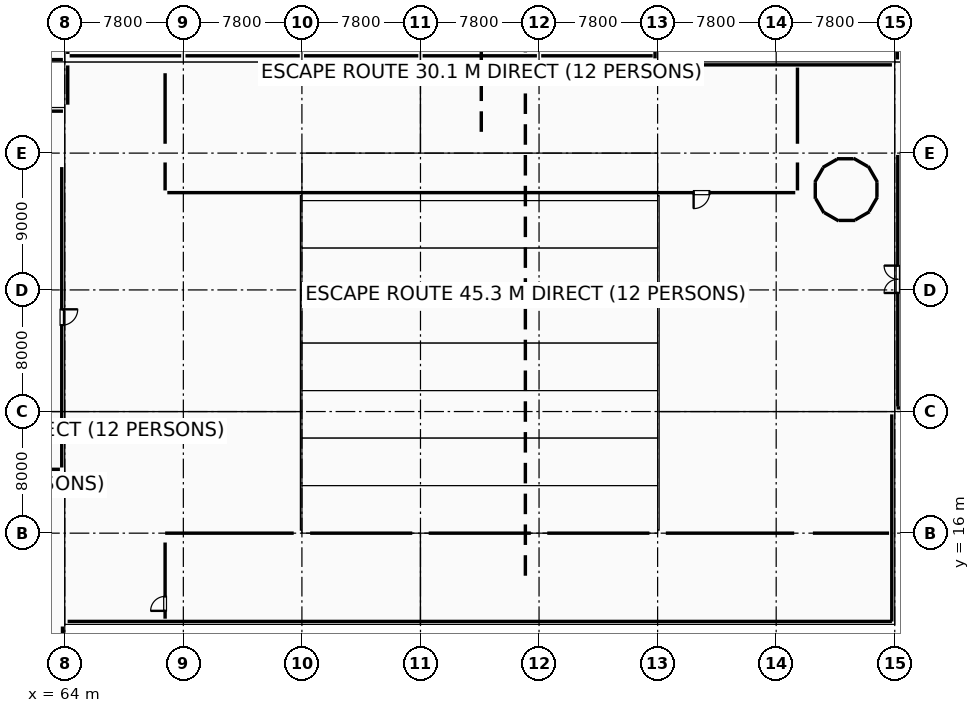
"""IFC4 building model, lengths in metres.
Left out: names, types, materials, properties, quantities, classifications, styles, units other than length and angle.
Written with IfcOpenShell. Run it as: python <this file> out.ifc"""

import sys

from ifc_helpers import new_model, si_unit, direction, frame, frame_2d, origin, origin_2d, place, context, subcontext, project, spatial, rectangle, i_section, extrude, element, fill, save


model = new_model("IFC4")
c1 = context("Model", 3, precision=1e-05, world=origin(), true_north=direction((0.0, 1.0)))
c2 = subcontext(c1, "Body", "Model", "MODEL_VIEW")
j1 = project(units=[si_unit("LENGTHUNIT", "METRE"), si_unit("PLANEANGLEUNIT", "RADIAN")], contexts=[c1])
p1 = place(None, origin())
s1 = spatial("IfcSite", under=j1, at=p1, CompositionType="ELEMENT")
p2 = place(p1, origin())
s2 = spatial("IfcBuilding", under=s1, at=p2, CompositionType="ELEMENT")
p3 = place(p2, frame((0.0, 0.0, 5.4)))
s3 = spatial("IfcBuildingStorey", under=s2, at=p3, CompositionType="ELEMENT", Elevation=5.4)
for number, where, z_axis, x_axis in (
    (1, (64.0, 47.0, 0.0), (0.0, 0.0, 1.0), (1.0, 0.0, 0.0)),
    (2, (71.8, 47.0, 0.0), (0.0, 0.0, 1.0), (1.0, 0.0, 0.0)),
    (3, (79.6, 47.0, 0.0), (0.0, 0.0, 1.0), (1.0, 0.0, 0.0)),
    (4, (87.4, 47.0, 0.0), (0.0, 0.0, 1.0), (1.0, 0.0, 0.0)),
    (5, (95.2, 47.0, 0.0), (0.0, 0.0, 1.0), (1.0, 0.0, 0.0)),
    (6, (103.0, 47.0, 0.0), (0.0, 0.0, 1.0), (1.0, 0.0, 0.0)),
):
    element("IfcColumn", number, at=place(p3, frame(where, z_axis=z_axis, x_axis=x_axis)), inside=s3, PredefinedType="COLUMN", context=c2, shape_type="SweptSolid", body=[
        extrude(i_section(OverallWidth=0.25, OverallDepth=0.45, WebThickness=0.011, FlangeThickness=0.014, FilletRadius=0.015, at=origin_2d()), origin(), (0.0, 0.0, 1.0), 4.8),
    ])
for number, where, z_axis, x_axis in (
    (7, (70.0, 16.0, 0.0), (0.0, 0.0, 1.0), (1.0, 0.0, 0.0)),
    (8, (70.0, 41.0, 0.0), (0.0, 0.0, 1.0), (1.0, 0.0, 0.0)),
):
    element("IfcColumn", number, at=place(p3, frame(where, z_axis=z_axis, x_axis=x_axis)), inside=s3, PredefinedType="COLUMN", context=c2, shape_type="SweptSolid", body=[
        extrude(rectangle(XDim=1.2, YDim=1.2, at=origin_2d()), origin(), (0.0, 0.0, 1.0), 4.8),
    ])
for number, where, z_axis, x_axis in (
    (9, (79.6, 16.0, 0.0), (0.0, 0.0, 1.0), (1.0, 0.0, 0.0)),
    (10, (79.6, 41.0, 0.0), (0.0, 0.0, 1.0), (1.0, 0.0, 0.0)),
    (11, (87.4, 16.0, 0.0), (0.0, 0.0, 1.0), (1.0, 0.0, 0.0)),
    (12, (87.4, 41.0, 0.0), (0.0, 0.0, 1.0), (1.0, 0.0, 0.0)),
    (13, (95.2, 16.0, 0.0), (0.0, 0.0, 1.0), (1.0, 0.0, 0.0)),
    (14, (95.2, 41.0, 0.0), (0.0, 0.0, 1.0), (1.0, 0.0, 0.0)),
    (15, (103.0, 16.0, 0.0), (0.0, 0.0, 1.0), (1.0, 0.0, 0.0)),
    (16, (103.0, 41.0, 0.0), (0.0, 0.0, 1.0), (1.0, 0.0, 0.0)),
):
    element("IfcColumn", number, at=place(p3, frame(where, z_axis=z_axis, x_axis=x_axis)), inside=s3, PredefinedType="COLUMN", context=c2, shape_type="SweptSolid", body=[
        extrude(rectangle(XDim=1.05, YDim=1.05, at=origin_2d()), origin(), (0.0, 0.0, 1.0), 4.8),
    ])
for number, where, z_axis, x_axis in (
    (17, (112.6, 16.0, 0.0), (0.0, 0.0, 1.0), (1.0, 0.0, 0.0)),
    (18, (112.6, 41.0, 0.0), (0.0, 0.0, 1.0), (1.0, 0.0, 0.0)),
):
    element("IfcColumn", number, at=place(p3, frame(where, z_axis=z_axis, x_axis=x_axis)), inside=s3, PredefinedType="COLUMN", context=c2, shape_type="SweptSolid", body=[
        extrude(rectangle(XDim=1.2, YDim=1.2, at=origin_2d()), origin(), (0.0, 0.0, 1.0), 4.8),
    ])
p4 = place(p3, frame((40.12, 43.76, 0.0), z_axis=(0.0, 0.0, 1.0), x_axis=(1.0, 0.0, 0.0)))
e19 = element("IfcWall", 19, at=p4, inside=s3, PredefinedType="PARAPET", context=c2, shape_type="SweptSolid", body=[
    extrude(rectangle(XDim=23.76, YDim=0.18, at=frame_2d((11.88, 0.0))), origin(), (0.0, 0.0, 1.0), 0.88),
])
p5 = place(p3, frame((64.195, 44.185, 0.0), z_axis=(0.0, 0.0, 1.0), x_axis=(0.0, 1.0, 0.0)))
e20 = element("IfcWall", 20, at=p5, inside=s3, PredefinedType="STANDARD", context=c2, shape_type="SweptSolid", body=[
    extrude(rectangle(XDim=2.582, YDim=0.35, at=frame_2d((1.291, 0.0))), origin(), (0.0, 0.0, 1.0), 3.725),
])
p6 = place(p3, frame((63.876, 47.15, 0.0), z_axis=(0.0, 0.0, 1.0), x_axis=(-1.0, 0.0, 0.0)))
e21 = element("IfcWall", 21, at=p6, inside=s3, PredefinedType="ELEMENTEDWALL", context=c2, shape_type="SweptSolid", body=[
    extrude(rectangle(XDim=9.736, YDim=0.26, at=frame_2d((4.868, 0.0))), origin(), (0.0, 0.0, 1.0), 4.54),
])
p7 = place(p6, frame((4.426, 0.0, 0.95)))
e22 = element("IfcOpeningElement", 22, at=p7, cuts=e21, PredefinedType="OPENING", context=c2, shape_type="SweptSolid", body=[
    extrude(rectangle(XDim=0.9, YDim=2.1, at=frame_2d((0.45, 1.05))), frame((0.0, 0.14, 0.0), z_axis=(0.0, -1.0, 0.0), x_axis=(1.0, 0.0, 0.0)), (0.0, 0.0, 1.0), 0.28),
])
p8 = place(p3, frame((102.83, 49.767, 0.0), z_axis=(0.0, 0.0, 1.0), x_axis=(0.0, -1.0, 0.0)))
e23 = element("IfcWall", 23, at=p8, inside=s3, PredefinedType="STANDARD", context=c2, shape_type="SweptSolid", body=[
    extrude(rectangle(XDim=2.534, YDim=0.3, at=frame_2d((1.267, 0.0))), origin(), (0.0, 0.0, 1.0), 3.925),
])
p9 = place(p3, frame((103.129, 46.805, 0.0), z_axis=(0.0, 0.0, 1.0), x_axis=(1.0, 0.0, 0.0)))
e24 = element("IfcWall", 24, at=p9, inside=s3, PredefinedType="STANDARD", context=c2, shape_type="SweptSolid", body=[
    extrude(rectangle(XDim=15.286, YDim=0.35, at=frame_2d((7.643, 0.0))), origin(), (0.0, 0.0, 1.0), 3.725),
])
p10 = place(p3, frame((118.77, 47.16, 0.0), z_axis=(0.0, 0.0, 1.0), x_axis=(0.0, 1.0, 0.0)))
e25 = element("IfcWall", 25, at=p10, inside=s3, PredefinedType="STANDARD", context=c2, shape_type="SweptSolid", body=[
    extrude(rectangle(XDim=2.457, YDim=0.3, at=frame_2d((1.229, 0.0))), origin(), (0.0, 0.0, 1.0), 4.54),
])
p11 = place(p3, frame((126.015, 24.24, 0.0), z_axis=(0.0, 0.0, 1.0), x_axis=(-1.0, 0.0, 0.0)))
e26 = element("IfcWall", 26, at=p11, inside=s3, PredefinedType="PARAPET", context=c2, shape_type="SweptSolid", body=[
    extrude(rectangle(XDim=7.295, YDim=0.18, at=frame_2d((3.647, 0.0))), origin(), (0.0, 0.0, 1.0), 0.88),
])
p12 = place(p3, frame((118.405, 23.815, 0.0), z_axis=(0.0, 0.0, 1.0), x_axis=(0.0, -1.0, 0.0)))
e27 = element("IfcWall", 27, at=p12, inside=s3, PredefinedType="STANDARD", context=c2, shape_type="SweptSolid", body=[
    extrude(rectangle(XDim=13.63, YDim=0.35, at=frame_2d((6.815, 0.0))), origin(), (0.0, 0.0, 1.0), 3.725),
])
p13 = place(p3, frame((118.415, 10.195, 0.0), z_axis=(0.0, 0.0, 1.0), x_axis=(-1.0, 0.0, 0.0)))
e28 = element("IfcWall", 28, at=p13, inside=s3, PredefinedType="STANDARD", context=c2, shape_type="SweptSolid", body=[
    extrude(rectangle(XDim=54.23, YDim=0.35, at=frame_2d((27.115, 0.0))), origin(), (0.0, 0.0, 1.0), 3.725),
])
p14 = place(p3, frame((63.85, 9.86, 0.0), z_axis=(0.0, 0.0, 1.0), x_axis=(0.0, -1.0, 0.0)))
e29 = element("IfcWall", 29, at=p14, inside=s3, PredefinedType="ELEMENTEDWALL", context=c2, shape_type="SweptSolid", body=[
    extrude(rectangle(XDim=1.402, YDim=0.26, at=frame_2d((0.701, 0.0))), origin(), (0.0, 0.0, 1.0), 4.54),
])
p15 = place(p3, frame((117.461, 39.086, 0.0), z_axis=(0.0, 0.0, 1.0), x_axis=(-0.500080723117, 0.865978793255, 0.0)))
e30 = element("IfcWall", 30, at=p15, inside=s3, PredefinedType="SHEAR", context=c2, shape_type="SweptSolid", body=[
    extrude(rectangle(XDim=1.219, YDim=0.35, at=frame_2d((0.609, 0.0))), origin(), (0.0, 0.0, 1.0), 4.54),
])
for number, where, z_axis, x_axis in (
    (31, (116.833, 40.115, 0.0), (0.0, 0.0, 1.0), (-0.866, 0.5, 0.0)),
    (32, (115.884, 40.628, 0.0), (0.0, 0.0, 1.0), (-1.0, 0.0, 0.0)),
    (33, (114.804, 40.598, 0.0), (0.0, 0.0, 1.0), (-0.866, -0.5, 0.0)),
    (34, (113.885, 40.033, 0.0), (0.0, 0.0, 1.0), (-0.5, -0.866, 0.0)),
    (35, (113.372, 39.083, 0.0), (0.0, 0.0, 1.0), (0.0, -1.0, 0.0)),
    (36, (113.402, 38.004, 0.0), (0.0, 0.0, 1.0), (0.5, -0.866, 0.0)),
    (37, (113.967, 37.085, 0.0), (0.0, 0.0, 1.0), (0.866, -0.5, 0.0)),
    (38, (114.917, 36.572, 0.0), (0.0, 0.0, 1.0), (1.0, 0.0, 0.0)),
    (39, (115.996, 36.602, 0.0), (0.0, 0.0, 1.0), (0.866, 0.5, 0.0)),
    (40, (116.915, 37.167, 0.0), (0.0, 0.0, 1.0), (0.5, 0.866, 0.0)),
):
    element("IfcWall", number, at=place(p3, frame(where, z_axis=z_axis, x_axis=x_axis)), inside=s3, PredefinedType="SHEAR", context=c2, shape_type="SweptSolid", body=[
        extrude(rectangle(XDim=1.093, YDim=0.35, at=frame_2d((0.546, 0.0))), origin(), (0.0, 0.0, 1.0), 4.54),
    ])
p16 = place(p3, frame((117.428, 38.116, 0.0), z_axis=(0.0, 0.0, 1.0), x_axis=(0.0, 1.0, 0.0)))
e41 = element("IfcWall", 41, at=p16, inside=s3, PredefinedType="SHEAR", context=c2, shape_type="SweptSolid", body=[
    extrude(rectangle(XDim=0.967, YDim=0.35, at=frame_2d((0.483, 0.0))), origin(), (0.0, 0.0, 1.0), 4.54),
])
p17 = place(p3, frame((112.2, 46.626, 0.0), z_axis=(0.0, 0.0, 1.0), x_axis=(0.0, -1.0, 0.0)))
e42 = element("IfcWall", 42, at=p17, inside=s3, PredefinedType="PARTITIONING", context=c2, shape_type="SweptSolid", body=[
    extrude(rectangle(XDim=5.011, YDim=0.25, at=frame_2d((2.505, 0.0))), origin(), (0.0, 0.0, 1.0), 3.72),
])
p18 = place(p3, frame((112.2, 40.385, 0.0), z_axis=(0.0, 0.0, 1.0), x_axis=(0.0, -1.0, 0.0)))
e43 = element("IfcWall", 43, at=p18, inside=s3, PredefinedType="PARTITIONING", context=c2, shape_type="SweptSolid", body=[
    extrude(rectangle(XDim=1.84, YDim=0.25, at=frame_2d((0.92, 0.0))), origin(), (0.0, 0.0, 1.0), 3.72),
])
p19 = place(p3, frame((112.055, 38.4, 0.0), z_axis=(0.0, 0.0, 1.0), x_axis=(-1.0, 0.0, 0.0)))
e44 = element("IfcWall", 44, at=p19, inside=s3, PredefinedType="PARTITIONING", context=c2, shape_type="SweptSolid", body=[
    extrude(rectangle(XDim=41.31, YDim=0.25, at=frame_2d((20.655, 0.0))), origin(), (0.0, 0.0, 1.0), 3.72),
])
p20 = place(p19, frame((5.636, 0.0, 0.0)))
e45 = element("IfcOpeningElement", 45, at=p20, cuts=e44, PredefinedType="OPENING", context=c2, shape_type="SweptSolid", body=[
    extrude(rectangle(XDim=1.05, YDim=2.15, at=frame_2d((0.525, 1.075))), frame((0.0, 0.135, 0.0), z_axis=(0.0, -1.0, 0.0), x_axis=(1.0, 0.0, 0.0)), (0.0, 0.0, 1.0), 0.27),
])
p21 = place(p3, frame((70.6, 38.545, 0.0), z_axis=(0.0, 0.0, 1.0), x_axis=(0.0, 1.0, 0.0)))
e46 = element("IfcWall", 46, at=p21, inside=s3, PredefinedType="PARTITIONING", context=c2, shape_type="SweptSolid", body=[
    extrude(rectangle(XDim=1.84, YDim=0.25, at=frame_2d((0.92, 0.0))), origin(), (0.0, 0.0, 1.0), 3.72),
])
p22 = place(p3, frame((70.6, 41.615, 0.0), z_axis=(0.0, 0.0, 1.0), x_axis=(0.0, 1.0, 0.0)))
e47 = element("IfcWall", 47, at=p22, inside=s3, PredefinedType="PARTITIONING", context=c2, shape_type="SweptSolid", body=[
    extrude(rectangle(XDim=4.64, YDim=0.25, at=frame_2d((2.32, 0.0))), origin(), (0.0, 0.0, 1.0), 3.72),
])
p23 = place(p3, frame((70.604, 16.0, 0.0), z_axis=(0.0, 0.0, 1.0), x_axis=(1.0, 0.0, 0.0)))
e48 = element("IfcWall", 48, at=p23, inside=s3, PredefinedType="PARTITIONING", context=c2, shape_type="SweptSolid", body=[
    extrude(rectangle(XDim=8.456, YDim=0.15, at=frame_2d((4.228, 0.0))), origin(), (0.0, 0.0, 1.0), 3.72),
])
p24 = place(p3, frame((80.14, 16.0, 0.0), z_axis=(0.0, 0.0, 1.0), x_axis=(1.0, 0.0, 0.0)))
e49 = element("IfcWall", 49, at=p24, inside=s3, PredefinedType="PARTITIONING", context=c2, shape_type="SweptSolid", body=[
    extrude(rectangle(XDim=6.72, YDim=0.15, at=frame_2d((3.36, 0.0))), origin(), (0.0, 0.0, 1.0), 3.72),
])
for number, where, z_axis, x_axis in (
    (50, (87.94, 16.0, 0.0), (0.0, 0.0, 1.0), (1.0, 0.0, 0.0)),
    (51, (95.74, 16.0, 0.0), (0.0, 0.0, 1.0), (1.0, 0.0, 0.0)),
):
    element("IfcWall", number, at=place(p3, frame(where, z_axis=z_axis, x_axis=x_axis)), inside=s3, PredefinedType="PARTITIONING", context=c2, shape_type="SweptSolid", body=[
        extrude(rectangle(XDim=6.72, YDim=0.15, at=frame_2d((3.36, 0.0))), origin(), (0.0, 0.0, 1.0), 3.72),
    ])
p25 = place(p3, frame((103.54, 16.0, 0.0), z_axis=(0.0, 0.0, 1.0), x_axis=(1.0, 0.0, 0.0)))
e52 = element("IfcWall", 52, at=p25, inside=s3, PredefinedType="PARTITIONING", context=c2, shape_type="SweptSolid", body=[
    extrude(rectangle(XDim=8.445, YDim=0.15, at=frame_2d((4.223, 0.0))), origin(), (0.0, 0.0, 1.0), 3.72),
])
p26 = place(p3, frame((113.215, 16.0, 0.0), z_axis=(0.0, 0.0, 1.0), x_axis=(1.0, 0.0, 0.0)))
e53 = element("IfcWall", 53, at=p26, inside=s3, PredefinedType="PARTITIONING", context=c2, shape_type="SweptSolid", body=[
    extrude(rectangle(XDim=5.011, YDim=0.15, at=frame_2d((2.505, 0.0))), origin(), (0.0, 0.0, 1.0), 3.72),
])
p27 = place(p3, frame((70.6, 10.374, 0.0), z_axis=(0.0, 0.0, 1.0), x_axis=(0.0, 1.0, 0.0)))
e54 = element("IfcWall", 54, at=p27, inside=s3, PredefinedType="PARTITIONING", context=c2, shape_type="SweptSolid", body=[
    extrude(rectangle(XDim=5.011, YDim=0.15, at=frame_2d((2.505, 0.0))), origin(), (0.0, 0.0, 1.0), 3.72),
])
p28 = place(p27, frame((0.515, 0.0, 0.0)))
e55 = element("IfcOpeningElement", 55, at=p28, cuts=e54, PredefinedType="OPENING", context=c2, shape_type="SweptSolid", body=[
    extrude(rectangle(XDim=0.95, YDim=2.15, at=frame_2d((0.475, 1.075))), frame((0.0, 0.085, 0.0), z_axis=(0.0, -1.0, 0.0), x_axis=(1.0, 0.0, 0.0)), (0.0, 0.0, 1.0), 0.17),
])
p29 = place(p3, frame((40.52, 19.6, 0.0), z_axis=(0.0, 0.0, 1.0), x_axis=(1.0, 0.0, 0.0)))
e56 = element("IfcWall", 56, at=p29, inside=s3, PredefinedType="PARTITIONING", context=c2, shape_type="SweptSolid", body=[
    extrude(rectangle(XDim=23.16, YDim=0.2, at=frame_2d((11.58, 0.0))), origin(), (0.0, 0.0, 1.0), 4.53),
])
p30 = place(p3, frame((63.8, 40.08, 0.0), z_axis=(0.0, 0.0, 1.0), x_axis=(0.0, -1.0, 0.0)))
e57 = element("IfcWall", 57, at=p30, inside=s3, PredefinedType="PARTITIONING", context=c2, shape_type="SweptSolid", body=[
    extrude(rectangle(XDim=19.76, YDim=0.2, at=frame_2d((9.88, 0.0))), origin(), (0.0, 0.0, 1.0), 3.72),
])
p31 = place(p30, frame((9.355, 0.0, 0.0)))
e58 = element("IfcOpeningElement", 58, at=p31, cuts=e57, PredefinedType="OPENING", context=c2, shape_type="SweptSolid", body=[
    extrude(rectangle(XDim=1.05, YDim=2.15, at=frame_2d((0.525, 1.075))), frame((0.0, 0.11, 0.0), z_axis=(0.0, -1.0, 0.0), x_axis=(1.0, 0.0, 0.0)), (0.0, 0.0, 1.0), 0.22),
])
p32 = place(p3, frame((63.68, 20.2, 0.0), z_axis=(0.0, 0.0, 1.0), x_axis=(-1.0, 0.0, 0.0)))
e59 = element("IfcWall", 59, at=p32, inside=s3, PredefinedType="PARTITIONING", context=c2, shape_type="SweptSolid", body=[
    extrude(rectangle(XDim=7.16, YDim=0.2, at=frame_2d((3.58, 0.0))), origin(), (0.0, 0.0, 1.0), 4.53),
])
p33 = place(p3, frame((118.92, 41.0, 0.0), z_axis=(0.0, 0.0, 1.0), x_axis=(1.0, 0.0, 0.0)))
e60 = element("IfcWall", 60, at=p33, inside=s3, PredefinedType="PARTITIONING", context=c2, shape_type="SweptSolid", body=[
    extrude(rectangle(XDim=7.09, YDim=0.2, at=frame_2d((3.545, 0.0))), origin(), (0.0, 0.0, 1.0), 4.53),
])
p34 = place(p33, frame((2.645, 0.0, 0.0)))
e61 = element("IfcOpeningElement", 61, at=p34, cuts=e60, PredefinedType="OPENING", context=c2, shape_type="SweptSolid", body=[
    extrude(rectangle(XDim=1.8, YDim=2.15, at=frame_2d((0.9, 1.075))), frame((0.0, 0.11, 0.0), z_axis=(0.0, -1.0, 0.0), x_axis=(1.0, 0.0, 0.0)), (0.0, 0.0, 1.0), 0.22),
])
p35 = place(p3, frame((118.8, 24.334, 0.0), z_axis=(0.0, 0.0, 1.0), x_axis=(0.0, 1.0, 0.0)))
e62 = element("IfcWall", 62, at=p35, inside=s3, PredefinedType="PARTITIONING", context=c2, shape_type="SweptSolid", body=[
    extrude(rectangle(XDim=16.546, YDim=0.2, at=frame_2d((8.273, 0.0))), origin(), (0.0, 0.0, 1.0), 3.72),
])
p36 = place(p35, frame((7.466, 0.0, 0.0)))
e63 = element("IfcOpeningElement", 63, at=p36, cuts=e62, PredefinedType="OPENING", context=c2, shape_type="SweptSolid", body=[
    extrude(rectangle(XDim=1.8, YDim=2.15, at=frame_2d((0.9, 1.075))), frame((0.0, 0.11, 0.0), z_axis=(0.0, -1.0, 0.0), x_axis=(1.0, 0.0, 0.0)), (0.0, 0.0, 1.0), 0.22),
])
p37 = place(p3, frame((102.676, 47.4, 0.0), z_axis=(0.0, 0.0, 1.0), x_axis=(-1.0, 0.0, 0.0)))
e64 = element("IfcWall", 64, at=p37, inside=s3, PredefinedType="PARTITIONING", context=c2, shape_type="SweptSolid", body=[
    extrude(rectangle(XDim=7.336, YDim=0.2, at=frame_2d((3.668, 0.0))), origin(), (0.0, 0.0, 1.0), 3.72),
])
for number, where, z_axis, x_axis in (
    (65, (95.06, 47.4, 0.0), (0.0, 0.0, 1.0), (-1.0, 0.0, 0.0)),
    (66, (87.26, 47.4, 0.0), (0.0, 0.0, 1.0), (-1.0, 0.0, 0.0)),
    (67, (79.46, 47.4, 0.0), (0.0, 0.0, 1.0), (-1.0, 0.0, 0.0)),
):
    element("IfcWall", number, at=place(p3, frame(where, z_axis=z_axis, x_axis=x_axis)), inside=s3, PredefinedType="PARTITIONING", context=c2, shape_type="SweptSolid", body=[
        extrude(rectangle(XDim=7.52, YDim=0.2, at=frame_2d((3.76, 0.0))), origin(), (0.0, 0.0, 1.0), 3.72),
    ])
p38 = place(p3, frame((71.66, 47.4, 0.0), z_axis=(0.0, 0.0, 1.0), x_axis=(-1.0, 0.0, 0.0)))
e68 = element("IfcWall", 68, at=p38, inside=s3, PredefinedType="PARTITIONING", context=c2, shape_type="SweptSolid", body=[
    extrude(rectangle(XDim=7.34, YDim=0.2, at=frame_2d((3.67, 0.0))), origin(), (0.0, 0.0, 1.0), 3.72),
])
p39 = place(p3, frame((64.2, 47.52, 0.0), z_axis=(0.0, 0.0, 1.0), x_axis=(0.0, 1.0, 0.0)))
e69 = element("IfcWall", 69, at=p39, inside=s3, PredefinedType="PARTITIONING", context=c2, shape_type="SweptSolid", body=[
    extrude(rectangle(XDim=2.24, YDim=0.2, at=frame_2d((1.12, 0.0))), origin(), (0.0, 0.0, 1.0), 3.92),
])
p40 = place(p20, origin())
e70 = element("IfcDoor", 70, at=p40, inside=s3, OperationType="SINGLE_SWING_RIGHT", PredefinedType="DOOR", context=c2, shape_type="SweptSolid", body=[
    extrude(rectangle(XDim=1.05, YDim=2.15, at=frame_2d((0.525, 1.075))), frame((0.0, 0.025, 0.0), z_axis=(0.0, -1.0, 0.0), x_axis=(1.0, 0.0, 0.0)), (0.0, 0.0, 1.0), 0.05),
])
fill(e45, e70)
p41 = place(p28, origin())
e71 = element("IfcDoor", 71, at=p41, inside=s3, OperationType="SINGLE_SWING_LEFT", PredefinedType="DOOR", context=c2, shape_type="SweptSolid", body=[
    extrude(rectangle(XDim=0.95, YDim=2.15, at=frame_2d((0.475, 1.075))), frame((0.0, 0.025, 0.0), z_axis=(0.0, -1.0, 0.0), x_axis=(1.0, 0.0, 0.0)), (0.0, 0.0, 1.0), 0.05),
])
fill(e55, e71)
p42 = place(p31, origin())
e72 = element("IfcDoor", 72, at=p42, inside=s3, OperationType="SINGLE_SWING_LEFT", PredefinedType="DOOR", context=c2, shape_type="SweptSolid", body=[
    extrude(rectangle(XDim=1.05, YDim=2.15, at=frame_2d((0.525, 1.075))), frame((0.0, 0.025, 0.0), z_axis=(0.0, -1.0, 0.0), x_axis=(1.0, 0.0, 0.0)), (0.0, 0.0, 1.0), 0.05),
])
fill(e58, e72)
p43 = place(p36, origin())
e73 = element("IfcDoor", 73, at=p43, inside=s3, OperationType="DOUBLE_DOOR_SINGLE_SWING", PredefinedType="DOOR", context=c2, shape_type="SweptSolid", body=[
    extrude(rectangle(XDim=1.8, YDim=2.15, at=frame_2d((0.9, 1.075))), frame((0.0, 0.025, 0.0), z_axis=(0.0, -1.0, 0.0), x_axis=(1.0, 0.0, 0.0)), (0.0, 0.0, 1.0), 0.05),
])
fill(e63, e73)
save(model, sys.argv[1])
